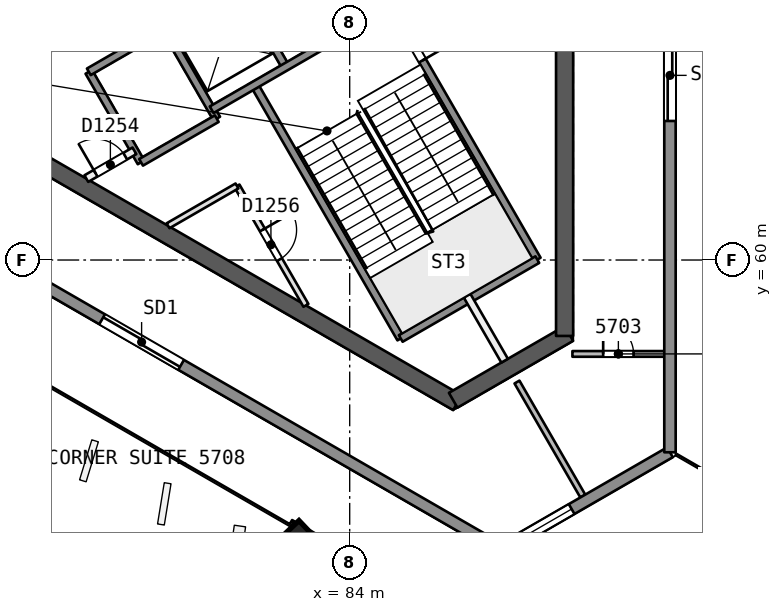
"""IFC4 building model, lengths in metres.
Left out: names, types, materials, properties, quantities, classifications, styles, units other than length and angle.
Written with IfcOpenShell. Run it as: python <this file> out.ifc"""

import sys

from ifc_helpers import new_model, si_unit, direction, frame, frame_2d, origin, origin_2d, place, context, subcontext, project, spatial, rectangle, extrude, element, fill, save


model = new_model("IFC4")
c1 = context("Model", 3, precision=1e-05, world=origin(), true_north=direction((0.0, 1.0)))
c2 = subcontext(c1, "Body", "Model", "MODEL_VIEW")
j1 = project(units=[si_unit("LENGTHUNIT", "METRE"), si_unit("PLANEANGLEUNIT", "RADIAN")], contexts=[c1])
p1 = place(None, origin())
s1 = spatial("IfcSite", under=j1, at=p1, CompositionType="ELEMENT")
p2 = place(p1, origin())
s2 = spatial("IfcBuilding", under=s1, at=p2, CompositionType="ELEMENT")
p3 = place(p2, frame((0.0, 0.0, 231.7)))
s3 = spatial("IfcBuildingStorey", under=s2, at=p3, CompositionType="ELEMENT", Elevation=231.7)
p4 = place(p3, frame((79.63, 71.981, 0.0), z_axis=(0.0, 0.0, 1.0), x_axis=(-0.500002171595, -0.86602415001, 0.0)))
e1 = element("IfcWall", 1, at=p4, inside=s3, PredefinedType="SHEAR", context=c2, shape_type="SweptSolid", body=[
    extrude(rectangle(XDim=10.25, YDim=0.45, at=frame_2d((5.125, 0.0))), origin(), (0.0, 0.0, 1.0), 3.7),
])
p5 = place(p4, frame((0.82, 0.0, 0.0)))
e2 = element("IfcOpeningElement", 2, at=p5, cuts=e1, PredefinedType="OPENING", context=c2, shape_type="SweptSolid", body=[
    extrude(rectangle(XDim=1.2, YDim=2.1, at=frame_2d((0.6, 1.05))), frame((0.0, 0.235, 0.0), z_axis=(0.0, -1.0, 0.0), x_axis=(1.0, 0.0, 0.0)), (0.0, 0.0, 1.0), 0.471),
])
p6 = place(p3, frame((74.617, 63.299, 0.0), z_axis=(0.0, 0.0, 1.0), x_axis=(0.86602594008, -0.499999071108, 0.0)))
e3 = element("IfcWall", 3, at=p6, inside=s3, PredefinedType="SHEAR", context=c2, shape_type="SweptSolid", body=[
    extrude(rectangle(XDim=14.108, YDim=0.45, at=frame_2d((7.054, 0.0))), origin(), (0.0, 0.0, 1.0), 3.7),
])
p7 = place(p3, frame((86.723, 56.31, 0.0), z_axis=(0.0, 0.0, 1.0), x_axis=(0.866042179588, 0.49997094233, 0.0)))
e4 = element("IfcWall", 4, at=p7, inside=s3, PredefinedType="SHEAR", context=c2, shape_type="SweptSolid", body=[
    extrude(rectangle(XDim=3.515, YDim=0.45, at=frame_2d((1.758, 0.0))), origin(), (0.0, 0.0, 1.0), 3.7),
])
p8 = place(p3, frame((89.655, 58.002, 0.0), z_axis=(0.0, 0.0, 1.0), x_axis=(0.0, 1.0, 0.0)))
e5 = element("IfcWall", 5, at=p8, inside=s3, PredefinedType="SHEAR", context=c2, shape_type="SweptSolid", body=[
    extrude(rectangle(XDim=14.204, YDim=0.45, at=frame_2d((7.102, 0.0))), origin(), (0.0, 0.0, 1.0), 3.7),
])
p9 = place(p3, frame((82.659, 52.51, 0.0), z_axis=(-0.00837646992, 0.028097450282, 0.999570091609), x_axis=(-0.499671890349, -0.865980240747, 0.02015501501)))
e6 = element("IfcColumn", 6, at=p9, inside=s3, PredefinedType="COLUMN", context=c2, shape_type="SweptSolid", body=[
    extrude(rectangle(XDim=0.85, YDim=0.85, at=origin_2d()), origin(), (0.0, 0.0, 1.0), 3.702),
])
p10 = place(p3, frame((91.483, 51.451, 0.0), z_axis=(-0.017607037296, 0.030466109479, 0.999380712447), x_axis=(-0.865807658641, -0.500376956142, 2.31533e-07)))
e7 = element("IfcColumn", 7, at=p10, inside=s3, PredefinedType="COLUMN", context=c2, shape_type="SweptSolid", body=[
    extrude(rectangle(XDim=1.9, YDim=1.9, at=origin_2d()), origin(), (0.0, 0.0, 1.0), 3.702),
])
p11 = place(p3, frame((89.861, 57.529, 0.0), z_axis=(0.0, 0.0, 1.0), x_axis=(1.0, 0.0, 0.0)))
e8 = element("IfcWall", 8, at=p11, inside=s3, PredefinedType="PARTITIONING", context=c2, shape_type="SweptSolid", body=[
    extrude(rectangle(XDim=2.418, YDim=0.15, at=frame_2d((1.209, 0.0))), origin(), (0.0, 0.0, 1.0), 3.3),
])
p12 = place(p11, frame((0.809, 0.0, 0.0)))
e9 = element("IfcOpeningElement", 9, at=p12, cuts=e8, PredefinedType="OPENING", context=c2, shape_type="SweptSolid", body=[
    extrude(rectangle(XDim=0.8, YDim=2.1, at=frame_2d((0.4, 1.05))), frame((0.0, 0.085, 0.0), z_axis=(0.0, -1.0, 0.0), x_axis=(1.0, 0.0, 0.0)), (0.0, 0.0, 1.0), 0.171),
])
p13 = place(p3, frame((88.402, 56.789, 0.0), z_axis=(0.0, 0.0, 1.0), x_axis=(0.500019299785, -0.866014260761, 0.0)))
e10 = element("IfcWall", 10, at=p13, inside=s3, PredefinedType="PARTITIONING", context=c2, shape_type="SweptSolid", body=[
    extrude(rectangle(XDim=3.465, YDim=0.15, at=frame_2d((1.732, 0.0))), origin(), (0.0, 0.0, 1.0), 3.3),
])
p14 = place(p3, frame((92.428, 54.941, 0.0), z_axis=(0.0, 0.0, 1.0), x_axis=(-0.866010338203, -0.500026093444, 0.0)))
e11 = element("IfcWall", 11, at=p14, inside=s3, PredefinedType="SOLIDWALL", context=c2, shape_type="SweptSolid", body=[
    extrude(rectangle(XDim=5.127, YDim=0.3, at=frame_2d((2.563, 0.0))), origin(), (0.0, 0.0, 1.0), 3.3),
])
p15 = place(p14, frame((2.988, 0.0, 0.9)))
e12 = element("IfcOpeningElement", 12, at=p15, cuts=e11, PredefinedType="OPENING", context=c2, shape_type="SweptSolid", body=[
    extrude(rectangle(XDim=1.8, YDim=1.5, at=frame_2d((0.9, 0.75))), frame((0.0, 0.161, 0.0), z_axis=(0.0, -1.0, 0.0), x_axis=(1.0, 0.0, 0.0)), (0.0, 0.0, 1.0), 0.321),
])
p16 = place(p3, frame((92.428, 105.059, 0.0), z_axis=(0.0, 0.0, 1.0), x_axis=(0.0, -1.0, 0.0)))
e13 = element("IfcWall", 13, at=p16, inside=s3, PredefinedType="SOLIDWALL", context=c2, shape_type="SweptSolid", body=[
    extrude(rectangle(XDim=50.118, YDim=0.3, at=frame_2d((25.059, 0.0))), origin(), (0.0, 0.0, 1.0), 3.3),
])
p17 = place(p16, frame((29.003, 0.0, 0.0)))
e14 = element("IfcOpeningElement", 14, at=p17, cuts=e13, PredefinedType="OPENING", context=c2, shape_type="SweptSolid", body=[
    extrude(rectangle(XDim=2.4, YDim=2.4, at=frame_2d((1.2, 1.2))), frame((0.0, 0.161, 0.0), z_axis=(0.0, -1.0, 0.0), x_axis=(1.0, 0.0, 0.0)), (0.0, 0.0, 1.0), 0.321),
])
p18 = place(p16, frame((39.0, 0.0, 0.0)))
e15 = element("IfcOpeningElement", 15, at=p18, cuts=e13, PredefinedType="OPENING", context=c2, shape_type="SweptSolid", body=[
    extrude(rectangle(XDim=2.4, YDim=2.4, at=frame_2d((1.2, 1.2))), frame((0.0, 0.161, 0.0), z_axis=(0.0, -1.0, 0.0), x_axis=(1.0, 0.0, 0.0)), (0.0, 0.0, 1.0), 0.321),
])
p19 = place(p16, frame((9.572, 0.0, 0.0)))
e16 = element("IfcOpeningElement", 16, at=p19, cuts=e13, PredefinedType="OPENING", context=c2, shape_type="SweptSolid", body=[
    extrude(rectangle(XDim=2.4, YDim=2.4, at=frame_2d((1.2, 1.2))), frame((0.0, 0.161, 0.0), z_axis=(0.0, -1.0, 0.0), x_axis=(1.0, 0.0, 0.0)), (0.0, 0.0, 1.0), 0.321),
])
p20 = place(p16, frame((23.391, 0.0, 0.0)))
e17 = element("IfcOpeningElement", 17, at=p20, cuts=e13, PredefinedType="OPENING", context=c2, shape_type="SweptSolid", body=[
    extrude(rectangle(XDim=2.4, YDim=2.4, at=frame_2d((1.2, 1.2))), frame((0.0, 0.161, 0.0), z_axis=(0.0, -1.0, 0.0), x_axis=(1.0, 0.0, 0.0)), (0.0, 0.0, 1.0), 0.321),
])
p21 = place(p3, frame((87.988, 52.377, 0.0), z_axis=(0.0, 0.0, 1.0), x_axis=(-0.866023992326, 0.500002444709, 0.0)))
e18 = element("IfcWall", 18, at=p21, inside=s3, PredefinedType="SOLIDWALL", context=c2, shape_type="SweptSolid", body=[
    extrude(rectangle(XDim=50.118, YDim=0.3, at=frame_2d((25.059, 0.0))), origin(), (0.0, 0.0, 1.0), 3.3),
])
p22 = place(p21, frame((24.015, 0.0, 0.0)))
e19 = element("IfcOpeningElement", 19, at=p22, cuts=e18, PredefinedType="OPENING", context=c2, shape_type="SweptSolid", body=[
    extrude(rectangle(XDim=2.4, YDim=2.4, at=frame_2d((1.2, 1.2))), frame((0.0, 0.161, 0.0), z_axis=(0.0, -1.0, 0.0), x_axis=(1.0, 0.0, 0.0)), (0.0, 0.0, 1.0), 0.321),
])
p23 = place(p21, frame((38.146, 0.0, 0.0)))
e20 = element("IfcOpeningElement", 20, at=p23, cuts=e18, PredefinedType="OPENING", context=c2, shape_type="SweptSolid", body=[
    extrude(rectangle(XDim=2.4, YDim=2.4, at=frame_2d((1.2, 1.2))), frame((0.0, 0.161, 0.0), z_axis=(0.0, -1.0, 0.0), x_axis=(1.0, 0.0, 0.0)), (0.0, 0.0, 1.0), 0.321),
])
p24 = place(p21, frame((9.727, 0.0, 0.0)))
e21 = element("IfcOpeningElement", 21, at=p24, cuts=e18, PredefinedType="OPENING", context=c2, shape_type="SweptSolid", body=[
    extrude(rectangle(XDim=2.4, YDim=2.4, at=frame_2d((1.2, 1.2))), frame((0.0, 0.161, 0.0), z_axis=(0.0, -1.0, 0.0), x_axis=(1.0, 0.0, 0.0)), (0.0, 0.0, 1.0), 0.321),
])
p25 = place(p3, frame((77.135, 64.952, 0.0), z_axis=(0.0, 0.0, 1.0), x_axis=(0.499996545922, -0.866027397988, 0.0)))
e22 = element("IfcWall", 22, at=p25, inside=s3, PredefinedType="SOLIDWALL", context=c2, shape_type="SweptSolid", body=[
    extrude(rectangle(XDim=2.75, YDim=0.2, at=frame_2d((1.375, 0.0))), origin(), (0.0, 0.0, 1.0), 3.3),
])
p26 = place(p3, frame((81.034, 61.949, 0.0), z_axis=(0.0, 0.0, 1.0), x_axis=(0.499945732631, -0.866056732798, 0.0)))
e23 = element("IfcWall", 23, at=p26, inside=s3, PredefinedType="PARTITIONING", context=c2, shape_type="SweptSolid", body=[
    extrude(rectangle(XDim=3.628, YDim=0.15, at=frame_2d((1.814, 0.0))), origin(), (0.0, 0.0, 1.0), 3.3),
])
p27 = place(p26, frame((1.337, 0.0, 0.0)))
e24 = element("IfcOpeningElement", 24, at=p27, cuts=e23, PredefinedType="OPENING", context=c2, shape_type="SweptSolid", body=[
    extrude(rectangle(XDim=0.9, YDim=2.1, at=frame_2d((0.45, 1.05))), frame((0.0, 0.085, 0.0), z_axis=(0.0, -1.0, 0.0), x_axis=(1.0, 0.0, 0.0)), (0.0, 0.0, 1.0), 0.171),
])
p28 = place(p3, frame((79.127, 66.102, 0.0), z_axis=(0.0, 0.0, 1.0), x_axis=(0.499996545922, -0.866027397988, 0.0)))
e25 = element("IfcWall", 25, at=p28, inside=s3, PredefinedType="SOLIDWALL", context=c2, shape_type="SweptSolid", body=[
    extrude(rectangle(XDim=2.75, YDim=0.2, at=frame_2d((1.375, 0.0))), origin(), (0.0, 0.0, 1.0), 3.3),
])
p29 = place(p3, frame((81.493, 64.604, 0.0), z_axis=(0.0, 0.0, 1.0), x_axis=(0.500006057782, -0.866021906294, 0.0)))
e26 = element("IfcWall", 26, at=p29, inside=s3, PredefinedType="SOLIDWALL", context=c2, shape_type="SweptSolid", body=[
    extrude(rectangle(XDim=7.7, YDim=0.2, at=frame_2d((3.85, 0.0))), origin(), (0.0, 0.0, 1.0), 3.3),
])
p30 = place(p3, frame((81.076, 67.227, 0.0), z_axis=(0.0, 0.0, 1.0), x_axis=(0.50000366821, -0.866023285932, 0.0)))
e27 = element("IfcWall", 27, at=p30, inside=s3, PredefinedType="SOLIDWALL", context=c2, shape_type="SweptSolid", body=[
    extrude(rectangle(XDim=2.48, YDim=0.2, at=frame_2d((1.24, 0.0))), origin(), (0.0, 0.0, 1.0), 3.3),
])
p31 = place(p3, frame((87.09, 59.06, 0.0), z_axis=(0.0, 0.0, 1.0), x_axis=(0.500011643316, -0.866018681408, 0.0)))
e28 = element("IfcWall", 28, at=p31, inside=s3, PredefinedType="PARTITIONING", context=c2, shape_type="SweptSolid", body=[
    extrude(rectangle(XDim=1.973, YDim=0.2, at=frame_2d((0.987, 0.0))), origin(), (0.0, 0.0, 1.0), 3.3),
])
p32 = place(p3, frame((85.087, 66.679, 0.0), z_axis=(0.0, 0.0, 1.0), x_axis=(0.500019787375, -0.866013979237, 0.0)))
e29 = element("IfcWall", 29, at=p32, inside=s3, PredefinedType="SOLIDWALL", context=c2, shape_type="SweptSolid", body=[
    extrude(rectangle(XDim=7.7, YDim=0.2, at=frame_2d((3.85, 0.0))), origin(), (0.0, 0.0, 1.0), 3.3),
])
p33 = place(p32, frame((0.55, 0.0, 0.0)))
e30 = element("IfcOpeningElement", 30, at=p33, cuts=e29, PredefinedType="OPENING", context=c2, shape_type="SweptSolid", body=[
    extrude(rectangle(XDim=1.1, YDim=2.1, at=frame_2d((0.55, 1.05))), frame((0.0, 0.11, 0.0), z_axis=(0.0, -1.0, 0.0), x_axis=(1.0, 0.0, 0.0)), (0.0, 0.0, 1.0), 0.221),
])
p34 = place(p3, frame((77.135, 64.952, 0.0), z_axis=(0.0, 0.0, 1.0), x_axis=(0.866031916153, 0.499988720078, 0.0)))
e31 = element("IfcWall", 31, at=p34, inside=s3, PredefinedType="SOLIDWALL", context=c2, shape_type="SweptSolid", body=[
    extrude(rectangle(XDim=11.35, YDim=0.2, at=frame_2d((5.675, 0.0))), origin(), (0.0, 0.0, 1.0), 3.3),
])
p35 = place(p34, frame((2.875, 0.0, 0.0)))
e32 = element("IfcOpeningElement", 32, at=p35, cuts=e31, PredefinedType="OPENING", context=c2, shape_type="SweptSolid", body=[
    extrude(rectangle(XDim=1.1, YDim=2.1, at=frame_2d((0.55, 1.05))), frame((0.0, 0.11, 0.0), z_axis=(0.0, -1.0, 0.0), x_axis=(1.0, 0.0, 0.0)), (0.0, 0.0, 1.0), 0.221),
])
p36 = place(p34, frame((5.125, 0.0, 0.0)))
e33 = element("IfcOpeningElement", 33, at=p36, cuts=e31, PredefinedType="OPENING", context=c2, shape_type="SweptSolid", body=[
    extrude(rectangle(XDim=1.1, YDim=2.1, at=frame_2d((0.55, 1.05))), frame((0.0, 0.11, 0.0), z_axis=(0.0, -1.0, 0.0), x_axis=(1.0, 0.0, 0.0)), (0.0, 0.0, 1.0), 0.221),
])
p37 = place(p34, frame((7.375, 0.0, 0.0)))
e34 = element("IfcOpeningElement", 34, at=p37, cuts=e31, PredefinedType="OPENING", context=c2, shape_type="SweptSolid", body=[
    extrude(rectangle(XDim=1.1, YDim=2.1, at=frame_2d((0.55, 1.05))), frame((0.0, 0.11, 0.0), z_axis=(0.0, -1.0, 0.0), x_axis=(1.0, 0.0, 0.0)), (0.0, 0.0, 1.0), 0.221),
])
p38 = place(p3, frame((77.07, 62.143, 0.0), z_axis=(0.0, 0.0, 1.0), x_axis=(0.866013036001, 0.500021421018, 0.0)))
e35 = element("IfcWall", 35, at=p38, inside=s3, PredefinedType="PARTITIONING", context=c2, shape_type="SweptSolid", body=[
    extrude(rectangle(XDim=1.461, YDim=0.2, at=frame_2d((0.73, 0.0))), origin(), (0.0, 0.0, 1.0), 3.3),
])
p39 = place(p38, frame((0.281, 0.0, 0.0)))
e36 = element("IfcOpeningElement", 36, at=p39, cuts=e35, PredefinedType="OPENING", context=c2, shape_type="SweptSolid", body=[
    extrude(rectangle(XDim=0.9, YDim=2.1, at=frame_2d((0.45, 1.05))), frame((0.0, 0.11, 0.0), z_axis=(0.0, -1.0, 0.0), x_axis=(1.0, 0.0, 0.0)), (0.0, 0.0, 1.0), 0.221),
])
p40 = place(p3, frame((80.367, 63.954, 0.0), z_axis=(0.0, 0.0, 1.0), x_axis=(0.866026575979, 0.499997969693, 0.0)))
e37 = element("IfcWall", 37, at=p40, inside=s3, PredefinedType="SOLIDWALL", context=c2, shape_type="SweptSolid", body=[
    extrude(rectangle(XDim=6.75, YDim=0.2, at=frame_2d((3.375, 0.0))), origin(), (0.0, 0.0, 1.0), 3.3),
])
p41 = place(p3, frame((78.51, 62.57, 0.0), z_axis=(0.0, 0.0, 1.0), x_axis=(0.866053019151, 0.499952165731, 0.0)))
e38 = element("IfcWall", 38, at=p41, inside=s3, PredefinedType="SOLIDWALL", context=c2, shape_type="SweptSolid", body=[
    extrude(rectangle(XDim=2.3, YDim=0.2, at=frame_2d((1.15, 0.0))), origin(), (0.0, 0.0, 1.0), 3.3),
])
p42 = place(p3, frame((79.22, 60.901, 0.0), z_axis=(0.0, 0.0, 1.0), x_axis=(0.866040030748, 0.499974664501, 0.0)))
e39 = element("IfcWall", 39, at=p42, inside=s3, PredefinedType="PARTITIONING", context=c2, shape_type="SweptSolid", body=[
    extrude(rectangle(XDim=2.095, YDim=0.15, at=frame_2d((1.047, 0.0))), origin(), (0.0, 0.0, 1.0), 3.3),
])
p43 = place(p3, frame((85.343, 57.935, 0.0), z_axis=(0.0, 0.0, 1.0), x_axis=(0.866004344652, 0.500036473714, 0.0)))
e40 = element("IfcWall", 40, at=p43, inside=s3, PredefinedType="SOLIDWALL", context=c2, shape_type="SweptSolid", body=[
    extrude(rectangle(XDim=4.15, YDim=0.2, at=frame_2d((2.075, 0.0))), origin(), (0.0, 0.0, 1.0), 3.3),
])
p44 = place(p12, origin())
e41 = element("IfcDoor", 41, at=p44, inside=s3, OperationType="SINGLE_SWING_LEFT", PredefinedType="NOTDEFINED", context=c2, shape_type="SweptSolid", body=[
    extrude(rectangle(XDim=0.8, YDim=2.1, at=frame_2d((0.4, 1.05))), frame((0.0, 0.025, 0.0), z_axis=(0.0, -1.0, 0.0), x_axis=(1.0, 0.0, 0.0)), (0.0, 0.0, 1.0), 0.05),
])
fill(e9, e41)
p45 = place(p15, origin())
e42 = element("IfcWindow", 42, at=p45, inside=s3, PartitioningType="SINGLE_PANEL", PredefinedType="WINDOW", context=c2, shape_type="SweptSolid", body=[
    extrude(rectangle(XDim=1.8, YDim=1.5, at=frame_2d((0.9, 0.75))), frame((0.0, 0.03, 0.0), z_axis=(0.0, -1.0, 0.0), x_axis=(1.0, 0.0, 0.0)), (0.0, 0.0, 1.0), 0.06),
])
fill(e12, e42)
p46 = place(p18, origin())
e43 = element("IfcDoor", 43, at=p46, inside=s3, OperationType="SLIDING_TO_RIGHT", PredefinedType="NOTDEFINED", context=c2, shape_type="SweptSolid", body=[
    extrude(rectangle(XDim=2.4, YDim=2.4, at=frame_2d((1.2, 1.2))), frame((0.0, 0.025, 0.0), z_axis=(0.0, -1.0, 0.0), x_axis=(1.0, 0.0, 0.0)), (0.0, 0.0, 1.0), 0.05),
])
fill(e15, e43)
p47 = place(p24, origin())
e44 = element("IfcDoor", 44, at=p47, inside=s3, OperationType="SLIDING_TO_LEFT", PredefinedType="NOTDEFINED", context=c2, shape_type="SweptSolid", body=[
    extrude(rectangle(XDim=2.4, YDim=2.4, at=frame_2d((1.2, 1.2))), frame((0.0, 0.025, 0.0), z_axis=(0.0, -1.0, 0.0), x_axis=(1.0, 0.0, 0.0)), (0.0, 0.0, 1.0), 0.05),
])
fill(e21, e44)
p48 = place(p39, origin())
e45 = element("IfcDoor", 45, at=p48, inside=s3, OperationType="SINGLE_SWING_LEFT", PredefinedType="NOTDEFINED", context=c2, shape_type="SweptSolid", body=[
    extrude(rectangle(XDim=0.9, YDim=2.1, at=frame_2d((0.45, 1.05))), frame((0.0, 0.025, 0.0), z_axis=(0.0, -1.0, 0.0), x_axis=(1.0, 0.0, 0.0)), (0.0, 0.0, 1.0), 0.05),
])
fill(e36, e45)
p49 = place(p33, origin())
e46 = element("IfcDoor", 46, at=p49, inside=s3, OperationType="SINGLE_SWING_RIGHT", PredefinedType="NOTDEFINED", context=c2, shape_type="SweptSolid", body=[
    extrude(rectangle(XDim=1.1, YDim=2.1, at=frame_2d((0.55, 1.05))), frame((0.0, 0.025, 0.0), z_axis=(0.0, -1.0, 0.0), x_axis=(1.0, 0.0, 0.0)), (0.0, 0.0, 1.0), 0.05),
])
fill(e30, e46)
p50 = place(p27, origin())
e47 = element("IfcDoor", 47, at=p50, inside=s3, OperationType="SINGLE_SWING_LEFT", PredefinedType="NOTDEFINED", context=c2, shape_type="SweptSolid", body=[
    extrude(rectangle(XDim=0.9, YDim=2.1, at=frame_2d((0.45, 1.05))), frame((0.0, 0.025, 0.0), z_axis=(0.0, -1.0, 0.0), x_axis=(1.0, 0.0, 0.0)), (0.0, 0.0, 1.0), 0.05),
])
fill(e24, e47)
save(model, sys.argv[1])
